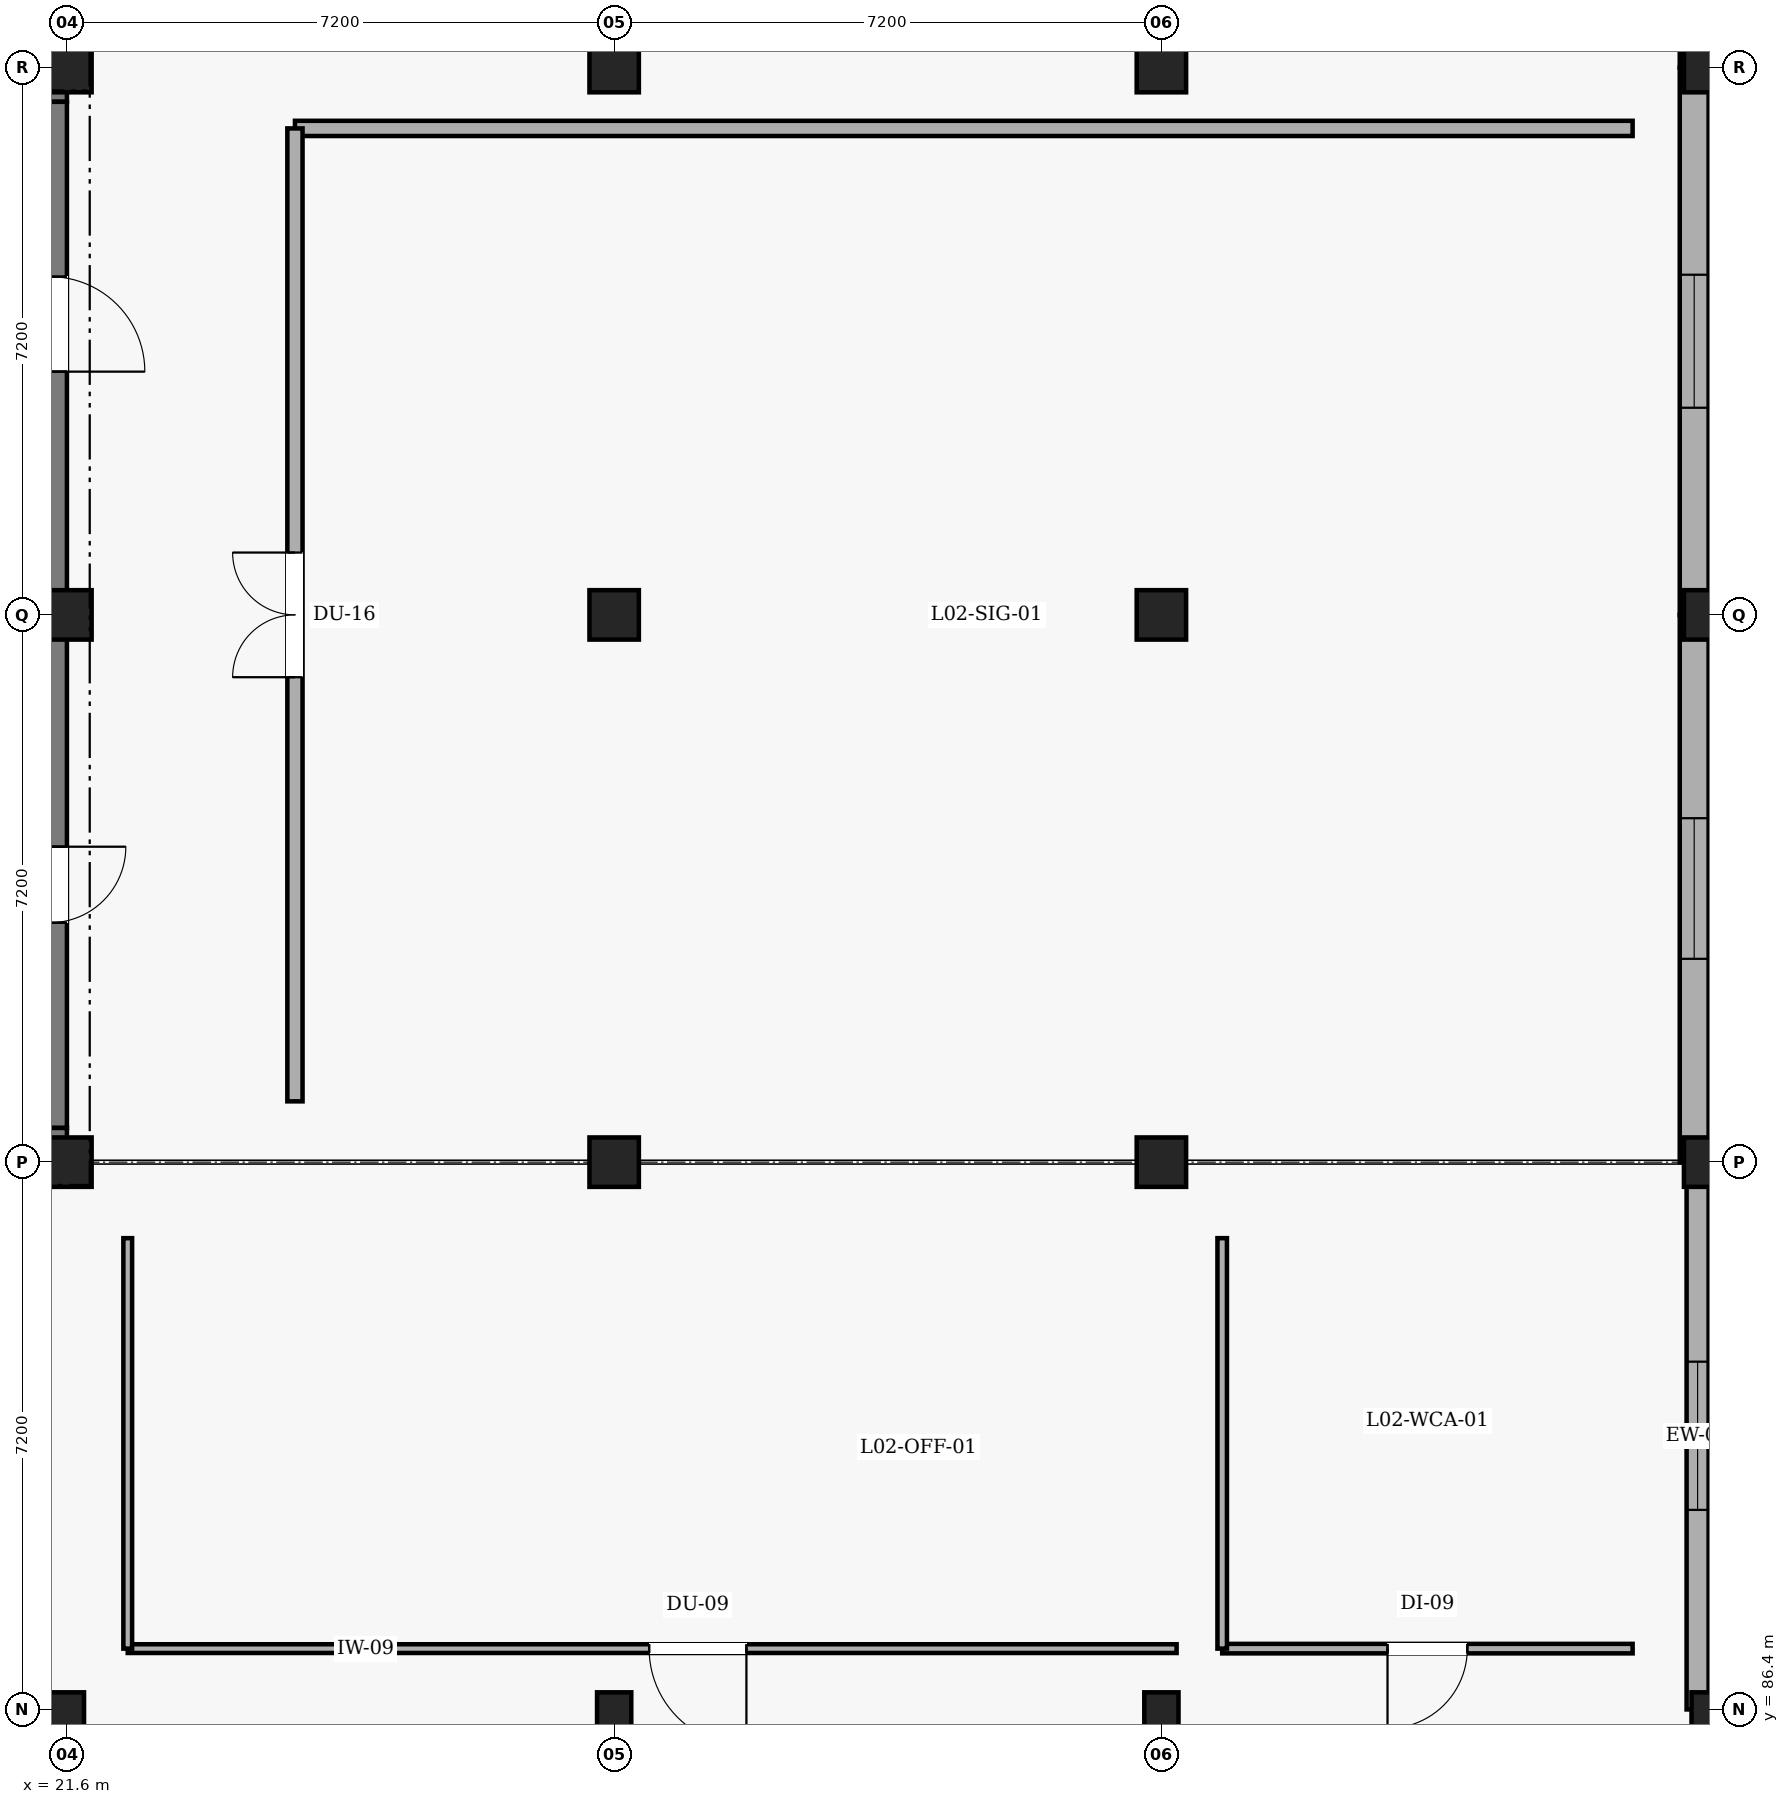
"""IFC4 building model, lengths in metres.
Left out: names, types, materials, properties, quantities, classifications, styles, units other than length and angle.
Written with IfcOpenShell. Run it as: python <this file> out.ifc"""

import sys

from ifc_helpers import new_model, si_unit, direction, frame, frame_2d, origin, origin_2d, place, context, subcontext, project, spatial, rectangle, extrude, element, fill, save


model = new_model("IFC4")
c1 = context("Model", 3, precision=1e-05, world=origin(), true_north=direction((0.0, 1.0)))
c2 = subcontext(c1, "Body", "Model", "MODEL_VIEW")
j1 = project(units=[si_unit("LENGTHUNIT", "METRE"), si_unit("PLANEANGLEUNIT", "RADIAN")], contexts=[c1])
p1 = place(None, origin())
s1 = spatial("IfcSite", under=j1, at=p1, CompositionType="ELEMENT")
p2 = place(p1, origin())
s2 = spatial("IfcBuilding", under=s1, at=p2, CompositionType="ELEMENT")
p3 = place(p2, frame((0.0, 0.0, 9.6)))
s3 = spatial("IfcBuildingStorey", under=s2, at=p3, CompositionType="ELEMENT", Elevation=9.6)
p4 = place(p3, frame((7.2, 107.775, 0.0), z_axis=(0.0, 0.0, 1.0), x_axis=(1.0, 0.0, 0.0)))
e1 = element("IfcWall", 1, at=p4, inside=s3, PredefinedType="SHEAR", context=c2, shape_type="SweptSolid", body=[
    extrude(rectangle(XDim=14.4, YDim=0.45, at=frame_2d((7.2, 0.0))), origin(), (0.0, 0.0, 1.0), 4.2),
])
p5 = place(p4, frame((2.4, 0.0, 0.0)))
e2 = element("IfcOpeningElement", 2, at=p5, cuts=e1, PredefinedType="OPENING", context=c2, shape_type="SweptSolid", body=[
    extrude(rectangle(XDim=1.25, YDim=2.2, at=frame_2d((0.625, 1.1))), frame((0.0, 0.235, 0.0), z_axis=(0.0, -1.0, 0.0), x_axis=(1.0, 0.0, 0.0)), (0.0, 0.0, 1.0), 0.47),
])
p6 = place(p3, frame((21.375, 107.55, 0.0), z_axis=(0.0, 0.0, 1.0), x_axis=(0.0, -1.0, 0.0)))
e3 = element("IfcWall", 3, at=p6, inside=s3, PredefinedType="SHEAR", context=c2, shape_type="SweptSolid", body=[
    extrude(rectangle(XDim=13.5, YDim=0.45, at=frame_2d((6.75, 0.0))), origin(), (0.0, 0.0, 1.0), 4.2),
])
p7 = place(p6, frame((9.8, 0.0, 0.0)))
e4 = element("IfcOpeningElement", 4, at=p7, cuts=e3, PredefinedType="OPENING", context=c2, shape_type="SweptSolid", body=[
    extrude(rectangle(XDim=1.0, YDim=2.15, at=frame_2d((0.5, 1.075))), frame((0.0, 0.235, 0.0), z_axis=(0.0, -1.0, 0.0), x_axis=(1.0, 0.0, 0.0)), (0.0, 0.0, 1.0), 0.47),
])
p8 = place(p6, frame((2.3, 0.0, 0.0)))
e5 = element("IfcOpeningElement", 5, at=p8, cuts=e3, PredefinedType="OPENING", context=c2, shape_type="SweptSolid", body=[
    extrude(rectangle(XDim=1.25, YDim=2.2, at=frame_2d((0.625, 1.1))), frame((0.0, 0.235, 0.0), z_axis=(0.0, -1.0, 0.0), x_axis=(1.0, 0.0, 0.0)), (0.0, 0.0, 1.0), 0.47),
])
p9 = place(p3, frame((21.6, 93.825, 0.0), z_axis=(0.0, 0.0, 1.0), x_axis=(-1.0, 0.0, 0.0)))
e6 = element("IfcWall", 6, at=p9, inside=s3, PredefinedType="SHEAR", context=c2, shape_type="SweptSolid", body=[
    extrude(rectangle(XDim=14.4, YDim=0.45, at=frame_2d((7.2, 0.0))), origin(), (0.0, 0.0, 1.0), 4.2),
])
p10 = place(p3, frame((21.6, 108.2, 0.0), z_axis=(0.0, 0.0, 1.0), x_axis=(-1.0, 0.0, 0.0)))
e7 = element("IfcWall", 7, at=p10, inside=s3, PredefinedType="SHEAR", context=c2, shape_type="SweptSolid", body=[
    extrude(rectangle(XDim=7.2, YDim=0.4, at=frame_2d((3.6, 0.0))), origin(), (0.0, 0.0, 1.0), 4.2),
])
p11 = place(p3, frame((7.2, 86.225, 0.0), z_axis=(0.0, 0.0, 1.0), x_axis=(1.0, 0.0, 0.0)))
e8 = element("IfcWall", 8, at=p11, inside=s3, PredefinedType="SHEAR", context=c2, shape_type="SweptSolid", body=[
    extrude(rectangle(XDim=14.4, YDim=0.35, at=frame_2d((7.2, 0.0))), origin(), (0.0, 0.0, 1.0), 4.2),
])
p12 = place(p3, frame((21.6, 86.4, 0.0), z_axis=(0.0, 0.0, 1.0), x_axis=(1.0, 0.0, 0.0)))
e9 = element("IfcColumn", 9, at=p12, inside=s3, PredefinedType="COLUMN", context=c2, shape_type="SweptSolid", body=[
    extrude(rectangle(XDim=0.45, YDim=0.45, at=origin_2d()), origin(), (0.0, 0.0, 1.0), 3.9),
])
for number, where, z_axis, x_axis in (
    (10, (21.6, 93.6, 0.0), (0.0, 0.0, 1.0), (1.0, 0.0, 0.0)),
    (11, (21.6, 100.8, 0.0), (0.0, 0.0, 1.0), (1.0, 0.0, 0.0)),
    (12, (21.6, 108.0, 0.0), (0.0, 0.0, 1.0), (1.0, 0.0, 0.0)),
):
    element("IfcColumn", number, at=place(p3, frame(where, z_axis=z_axis, x_axis=x_axis)), inside=s3, PredefinedType="COLUMN", context=c2, shape_type="SweptSolid", body=[
        extrude(rectangle(XDim=0.65, YDim=0.65, at=origin_2d()), origin(), (0.0, 0.0, 1.0), 3.88),
    ])
p13 = place(p3, frame((28.8, 86.4, 0.0), z_axis=(0.0, 0.0, 1.0), x_axis=(1.0, 0.0, 0.0)))
e13 = element("IfcColumn", 13, at=p13, inside=s3, PredefinedType="COLUMN", context=c2, shape_type="SweptSolid", body=[
    extrude(rectangle(XDim=0.45, YDim=0.45, at=origin_2d()), origin(), (0.0, 0.0, 1.0), 3.9),
])
for number, where, z_axis, x_axis in (
    (14, (28.8, 93.6, 0.0), (0.0, 0.0, 1.0), (1.0, 0.0, 0.0)),
    (15, (28.8, 100.8, 0.0), (0.0, 0.0, 1.0), (1.0, 0.0, 0.0)),
    (16, (28.8, 108.0, 0.0), (0.0, 0.0, 1.0), (1.0, 0.0, 0.0)),
):
    element("IfcColumn", number, at=place(p3, frame(where, z_axis=z_axis, x_axis=x_axis)), inside=s3, PredefinedType="COLUMN", context=c2, shape_type="SweptSolid", body=[
        extrude(rectangle(XDim=0.65, YDim=0.65, at=origin_2d()), origin(), (0.0, 0.0, 1.0), 3.88),
    ])
p14 = place(p3, frame((36.0, 86.4, 0.0), z_axis=(0.0, 0.0, 1.0), x_axis=(1.0, 0.0, 0.0)))
e17 = element("IfcColumn", 17, at=p14, inside=s3, PredefinedType="COLUMN", context=c2, shape_type="SweptSolid", body=[
    extrude(rectangle(XDim=0.45, YDim=0.45, at=origin_2d()), origin(), (0.0, 0.0, 1.0), 3.9),
])
for number, where, z_axis, x_axis in (
    (18, (36.0, 93.6, 0.0), (0.0, 0.0, 1.0), (1.0, 0.0, 0.0)),
    (19, (36.0, 100.8, 0.0), (0.0, 0.0, 1.0), (1.0, 0.0, 0.0)),
    (20, (36.0, 108.0, 0.0), (0.0, 0.0, 1.0), (1.0, 0.0, 0.0)),
):
    element("IfcColumn", number, at=place(p3, frame(where, z_axis=z_axis, x_axis=x_axis)), inside=s3, PredefinedType="COLUMN", context=c2, shape_type="SweptSolid", body=[
        extrude(rectangle(XDim=0.65, YDim=0.65, at=origin_2d()), origin(), (0.0, 0.0, 1.0), 3.88),
    ])
p15 = place(p3, frame((43.2, 86.4, 0.0), z_axis=(0.0, 0.0, 1.0), x_axis=(0.0, 1.0, 0.0)))
e21 = element("IfcColumn", 21, at=p15, inside=s3, PredefinedType="COLUMN", context=c2, shape_type="SweptSolid", body=[
    extrude(rectangle(XDim=0.45, YDim=0.45, at=origin_2d()), origin(), (0.0, 0.0, 1.0), 3.9),
])
for number, where, z_axis, x_axis in (
    (22, (43.2, 93.6, 0.0), (0.0, 0.0, 1.0), (0.0, 1.0, 0.0)),
    (23, (43.2, 100.8, 0.0), (0.0, 0.0, 1.0), (1.0, 0.0, 0.0)),
    (24, (43.2, 108.0, 0.0), (0.0, 0.0, 1.0), (1.0, 0.0, 0.0)),
):
    element("IfcColumn", number, at=place(p3, frame(where, z_axis=z_axis, x_axis=x_axis)), inside=s3, PredefinedType="COLUMN", context=c2, shape_type="SweptSolid", body=[
        extrude(rectangle(XDim=0.65, YDim=0.65, at=origin_2d()), origin(), (0.0, 0.0, 1.0), 3.88),
    ])
p16 = place(p3, frame((43.01, 115.2, 0.0), z_axis=(0.0, 0.0, 1.0), x_axis=(0.0, -1.0, 0.0)))
e25 = element("IfcWall", 25, at=p16, inside=s3, PredefinedType="SOLIDWALL", context=c2, shape_type="SweptSolid", body=[
    extrude(rectangle(XDim=7.2, YDim=0.38, at=frame_2d((3.6, 0.0))), origin(), (0.0, 0.0, 1.0), 3.64),
])
p17 = place(p16, frame((2.775, 0.0, 0.9)))
e26 = element("IfcOpeningElement", 26, at=p17, cuts=e25, PredefinedType="OPENING", context=c2, shape_type="SweptSolid", body=[
    extrude(rectangle(XDim=1.65, YDim=1.4, at=frame_2d((0.825, 0.7))), frame((0.0, 0.2, 0.0), z_axis=(0.0, -1.0, 0.0), x_axis=(1.0, 0.0, 0.0)), (0.0, 0.0, 1.0), 0.4),
])
p18 = place(p3, frame((43.01, 108.0, 0.0), z_axis=(0.0, 0.0, 1.0), x_axis=(0.0, -1.0, 0.0)))
e27 = element("IfcWall", 27, at=p18, inside=s3, PredefinedType="SOLIDWALL", context=c2, shape_type="SweptSolid", body=[
    extrude(rectangle(XDim=7.2, YDim=0.38, at=frame_2d((3.6, 0.0))), origin(), (0.0, 0.0, 1.0), 3.64),
])
p19 = place(p18, frame((2.725, 0.0, 0.9)))
e28 = element("IfcOpeningElement", 28, at=p19, cuts=e27, PredefinedType="OPENING", context=c2, shape_type="SweptSolid", body=[
    extrude(rectangle(XDim=1.75, YDim=1.45, at=frame_2d((0.875, 0.725))), frame((0.0, 0.2, 0.0), z_axis=(0.0, -1.0, 0.0), x_axis=(1.0, 0.0, 0.0)), (0.0, 0.0, 1.0), 0.4),
])
p20 = place(p3, frame((43.01, 100.8, 0.0), z_axis=(0.0, 0.0, 1.0), x_axis=(0.0, -1.0, 0.0)))
e29 = element("IfcWall", 29, at=p20, inside=s3, PredefinedType="SOLIDWALL", context=c2, shape_type="SweptSolid", body=[
    extrude(rectangle(XDim=7.2, YDim=0.38, at=frame_2d((3.6, 0.0))), origin(), (0.0, 0.0, 1.0), 3.64),
])
p21 = place(p20, frame((2.675, 0.0, 0.9)))
e30 = element("IfcOpeningElement", 30, at=p21, cuts=e29, PredefinedType="OPENING", context=c2, shape_type="SweptSolid", body=[
    extrude(rectangle(XDim=1.85, YDim=1.5, at=frame_2d((0.925, 0.75))), frame((0.0, 0.2, 0.0), z_axis=(0.0, -1.0, 0.0), x_axis=(1.0, 0.0, 0.0)), (0.0, 0.0, 1.0), 0.4),
])
p22 = place(p3, frame((43.055, 93.6, 0.0), z_axis=(0.0, 0.0, 1.0), x_axis=(0.0, -1.0, 0.0)))
e31 = element("IfcWall", 31, at=p22, inside=s3, PredefinedType="SOLIDWALL", context=c2, shape_type="SweptSolid", body=[
    extrude(rectangle(XDim=7.2, YDim=0.29, at=frame_2d((3.6, 0.0))), origin(), (0.0, 0.0, 1.0), 3.6),
])
p23 = place(p22, frame((2.625, 0.0, 0.9)))
e32 = element("IfcOpeningElement", 32, at=p23, cuts=e31, PredefinedType="OPENING", context=c2, shape_type="SweptSolid", body=[
    extrude(rectangle(XDim=1.95, YDim=1.55, at=frame_2d((0.975, 0.775))), frame((0.0, 0.155, 0.0), z_axis=(0.0, -1.0, 0.0), x_axis=(1.0, 0.0, 0.0)), (0.0, 0.0, 1.0), 0.31),
])
p24 = place(p3, frame((36.2, 87.2, 0.0), z_axis=(0.0, 0.0, 1.0), x_axis=(-1.0, 0.0, 0.0)))
e33 = element("IfcWall", 33, at=p24, inside=s3, PredefinedType="PARTITIONING", context=c2, shape_type="SweptSolid", body=[
    extrude(rectangle(XDim=13.8, YDim=0.115, at=frame_2d((6.9, 0.0))), origin(), (0.0, 0.0, 1.0), 3.5),
])
p25 = place(p24, frame((5.66, 0.0, 0.0)))
e34 = element("IfcOpeningElement", 34, at=p25, cuts=e33, PredefinedType="OPENING", context=c2, shape_type="SweptSolid", body=[
    extrude(rectangle(XDim=1.28, YDim=2.15, at=frame_2d((0.64, 1.075))), frame((0.0, 0.067, 0.0), z_axis=(0.0, -1.0, 0.0), x_axis=(1.0, 0.0, 0.0)), (0.0, 0.0, 1.0), 0.135),
])
p26 = place(p3, frame((22.4, 87.2, 0.0), z_axis=(0.0, 0.0, 1.0), x_axis=(0.0, 1.0, 0.0)))
e35 = element("IfcWall", 35, at=p26, inside=s3, PredefinedType="PARTITIONING", context=c2, shape_type="SweptSolid", body=[
    extrude(rectangle(XDim=5.4, YDim=0.115, at=frame_2d((2.7, 0.0))), origin(), (0.0, 0.0, 1.0), 3.63),
])
p27 = place(p3, frame((42.2, 87.2, 0.0), z_axis=(0.0, 0.0, 1.0), x_axis=(-1.0, 0.0, 0.0)))
e36 = element("IfcWall", 36, at=p27, inside=s3, PredefinedType="PARTITIONING", context=c2, shape_type="SweptSolid", body=[
    extrude(rectangle(XDim=5.4, YDim=0.125, at=frame_2d((2.7, 0.0))), origin(), (0.0, 0.0, 1.0), 3.85),
])
p28 = place(p27, frame((2.175, 0.0, 0.0)))
e37 = element("IfcOpeningElement", 37, at=p28, cuts=e36, PredefinedType="OPENING", context=c2, shape_type="SweptSolid", body=[
    extrude(rectangle(XDim=1.05, YDim=2.1, at=frame_2d((0.525, 1.05))), frame((0.0, 0.073, 0.0), z_axis=(0.0, -1.0, 0.0), x_axis=(1.0, 0.0, 0.0)), (0.0, 0.0, 1.0), 0.145),
])
p29 = place(p3, frame((36.8, 87.2, 0.0), z_axis=(0.0, 0.0, 1.0), x_axis=(0.0, 1.0, 0.0)))
e38 = element("IfcWall", 38, at=p29, inside=s3, PredefinedType="PARTITIONING", context=c2, shape_type="SweptSolid", body=[
    extrude(rectangle(XDim=5.4, YDim=0.125, at=frame_2d((2.7, 0.0))), origin(), (0.0, 0.0, 1.0), 3.63),
])
p30 = place(p3, frame((24.6, 107.2, 0.0), z_axis=(0.0, 0.0, 1.0), x_axis=(1.0, 0.0, 0.0)))
e39 = element("IfcWall", 39, at=p30, inside=s3, PredefinedType="PARTITIONING", context=c2, shape_type="SweptSolid", body=[
    extrude(rectangle(XDim=17.6, YDim=0.2, at=frame_2d((8.8, 0.0))), origin(), (0.0, 0.0, 1.0), 3.43),
])
p31 = place(p3, frame((24.6, 94.4, 0.0), z_axis=(0.0, 0.0, 1.0), x_axis=(0.0, 1.0, 0.0)))
e40 = element("IfcWall", 40, at=p31, inside=s3, PredefinedType="PARTITIONING", context=c2, shape_type="SweptSolid", body=[
    extrude(rectangle(XDim=12.8, YDim=0.2, at=frame_2d((6.4, 0.0))), origin(), (0.0, 0.0, 1.0), 3.43),
])
p32 = place(p31, frame((5.58, 0.0, 0.0)))
e41 = element("IfcOpeningElement", 41, at=p32, cuts=e40, PredefinedType="OPENING", context=c2, shape_type="SweptSolid", body=[
    extrude(rectangle(XDim=1.64, YDim=2.2, at=frame_2d((0.82, 1.1))), frame((0.0, 0.11, 0.0), z_axis=(0.0, -1.0, 0.0), x_axis=(1.0, 0.0, 0.0)), (0.0, 0.0, 1.0), 0.22),
])
p33 = place(p19, origin())
e42 = element("IfcWindow", 42, at=p33, inside=s3, PartitioningType="SINGLE_PANEL", PredefinedType="WINDOW", context=c2, shape_type="SweptSolid", body=[
    extrude(rectangle(XDim=1.75, YDim=1.45, at=frame_2d((0.875, 0.725))), frame((0.0, 0.03, 0.0), z_axis=(0.0, -1.0, 0.0), x_axis=(1.0, 0.0, 0.0)), (0.0, 0.0, 1.0), 0.06),
])
fill(e28, e42)
p34 = place(p21, origin())
e43 = element("IfcWindow", 43, at=p34, inside=s3, PartitioningType="SINGLE_PANEL", PredefinedType="WINDOW", context=c2, shape_type="SweptSolid", body=[
    extrude(rectangle(XDim=1.85, YDim=1.5, at=frame_2d((0.925, 0.75))), frame((0.0, 0.03, 0.0), z_axis=(0.0, -1.0, 0.0), x_axis=(1.0, 0.0, 0.0)), (0.0, 0.0, 1.0), 0.06),
])
fill(e30, e43)
p35 = place(p23, origin())
e44 = element("IfcWindow", 44, at=p35, inside=s3, PartitioningType="SINGLE_PANEL", PredefinedType="WINDOW", context=c2, shape_type="SweptSolid", body=[
    extrude(rectangle(XDim=1.95, YDim=1.55, at=frame_2d((0.975, 0.775))), frame((0.0, 0.03, 0.0), z_axis=(0.0, -1.0, 0.0), x_axis=(1.0, 0.0, 0.0)), (0.0, 0.0, 1.0), 0.06),
])
fill(e32, e44)
p36 = place(p25, origin())
e45 = element("IfcDoor", 45, at=p36, inside=s3, OperationType="SINGLE_SWING_LEFT", PredefinedType="DOOR", context=c2, shape_type="SweptSolid", body=[
    extrude(rectangle(XDim=1.28, YDim=2.15, at=frame_2d((0.64, 1.075))), frame((0.0, 0.025, 0.0), z_axis=(0.0, -1.0, 0.0), x_axis=(1.0, 0.0, 0.0)), (0.0, 0.0, 1.0), 0.05),
])
fill(e34, e45)
p37 = place(p28, origin())
e46 = element("IfcDoor", 46, at=p37, inside=s3, OperationType="SINGLE_SWING_RIGHT", PredefinedType="DOOR", context=c2, shape_type="SweptSolid", body=[
    extrude(rectangle(XDim=1.05, YDim=2.1, at=frame_2d((0.525, 1.05))), frame((0.0, 0.025, 0.0), z_axis=(0.0, -1.0, 0.0), x_axis=(1.0, 0.0, 0.0)), (0.0, 0.0, 1.0), 0.05),
])
fill(e37, e46)
p38 = place(p32, origin())
e47 = element("IfcDoor", 47, at=p38, inside=s3, OperationType="DOUBLE_DOOR_SINGLE_SWING", PredefinedType="DOOR", context=c2, shape_type="SweptSolid", body=[
    extrude(rectangle(XDim=1.64, YDim=2.2, at=frame_2d((0.82, 1.1))), frame((0.0, 0.025, 0.0), z_axis=(0.0, -1.0, 0.0), x_axis=(1.0, 0.0, 0.0)), (0.0, 0.0, 1.0), 0.05),
])
fill(e41, e47)
save(model, sys.argv[1])
